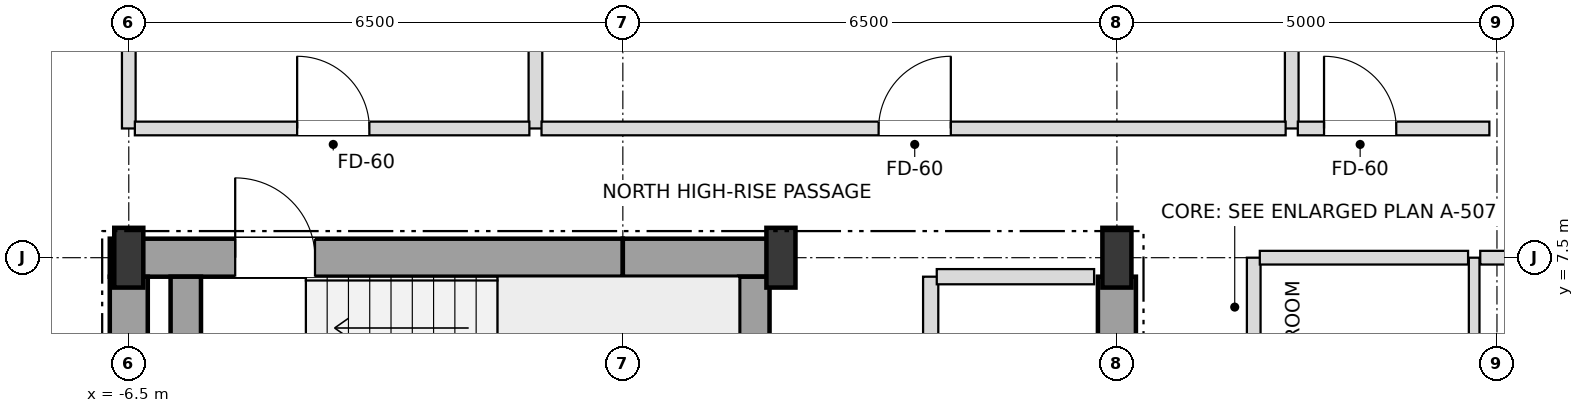
"""IFC4 building model, lengths in metres.
Left out: names, types, materials, properties, quantities, classifications, styles, units other than length and angle.
Written with IfcOpenShell. Run it as: python <this file> out.ifc"""

import sys

from ifc_helpers import new_model, si_unit, direction, frame, frame_2d, origin, origin_2d, place, context, subcontext, project, spatial, rectangle, i_section, extrude, element, fill, save


model = new_model("IFC4")
c1 = context("Model", 3, precision=1e-05, world=origin(), true_north=direction((0.0, 1.0)))
c2 = subcontext(c1, "Body", "Model", "MODEL_VIEW")
j1 = project(units=[si_unit("LENGTHUNIT", "METRE"), si_unit("PLANEANGLEUNIT", "RADIAN")], contexts=[c1])
p1 = place(None, origin())
s1 = spatial("IfcSite", under=j1, at=p1, CompositionType="ELEMENT")
p2 = place(p1, origin())
s2 = spatial("IfcBuilding", under=s1, at=p2, CompositionType="ELEMENT")
p3 = place(p2, frame((0.0, 0.0, 287.1)))
s3 = spatial("IfcBuildingStorey", under=s2, at=p3, CompositionType="ELEMENT", Elevation=287.1)
for number, where, z_axis, x_axis in (
    (1, (-6.5, 7.5, 0.0), (0.0, 0.0, 1.0), (1.0, 0.0, 0.0)),
    (2, (2.08, 7.5, 0.0), (0.0, 0.0, 1.0), (1.0, 0.0, 0.0)),
    (3, (6.5, 7.5, 0.0), (0.0, 0.0, 1.0), (1.0, 0.0, 0.0)),
):
    element("IfcColumn", number, at=place(p3, frame(where, z_axis=z_axis, x_axis=x_axis)), inside=s3, PredefinedType="COLUMN", context=c2, shape_type="SweptSolid", body=[
        extrude(i_section(OverallWidth=0.382, OverallDepth=0.786, WebThickness=0.02, FlangeThickness=0.033, at=origin_2d()), origin(), (0.0, 0.0, 1.0), 3.6),
    ])
p4 = place(p3, frame((-6.75, 7.5, 0.0), z_axis=(0.0, 0.0, 1.0), x_axis=(1.0, 0.0, 0.0)))
e4 = element("IfcWall", 4, at=p4, inside=s3, PredefinedType="SHEAR", context=c2, shape_type="SweptSolid", body=[
    extrude(rectangle(XDim=6.75, YDim=0.5, at=frame_2d((3.375, 0.0))), origin(), (0.0, 0.0, 1.0), 3.38),
])
p5 = place(p4, frame((1.65, 0.0, 0.0)))
e5 = element("IfcOpeningElement", 5, at=p5, cuts=e4, PredefinedType="OPENING", context=c2, shape_type="SweptSolid", body=[
    extrude(rectangle(XDim=1.05, YDim=2.15, at=frame_2d((0.525, 1.075))), frame((0.0, 0.26, 0.0), z_axis=(0.0, -1.0, 0.0), x_axis=(1.0, 0.0, 0.0)), (0.0, 0.0, 1.0), 0.52),
])
p6 = place(p3, frame((0.0, 7.5, 0.0), z_axis=(0.0, 0.0, 1.0), x_axis=(1.0, 0.0, 0.0)))
e6 = element("IfcWall", 6, at=p6, inside=s3, PredefinedType="SHEAR", context=c2, shape_type="SweptSolid", body=[
    extrude(rectangle(XDim=2.08, YDim=0.5, at=frame_2d((1.04, 0.0))), origin(), (0.0, 0.0, 1.0), 3.38),
])
for number, where, z_axis, x_axis in (
    (7, (-6.5, 3.95, 0.0), (0.0, 0.0, 1.0), (0.0, 1.0, 0.0)),
    (8, (6.5, 3.95, 0.0), (0.0, 0.0, 1.0), (0.0, 1.0, 0.0)),
):
    element("IfcWall", number, at=place(p3, frame(where, z_axis=z_axis, x_axis=x_axis)), inside=s3, PredefinedType="SHEAR", context=c2, shape_type="SweptSolid", body=[
        extrude(rectangle(XDim=3.3, YDim=0.5, at=frame_2d((1.65, 0.0))), origin(), (0.0, 0.0, 1.0), 3.38),
    ])
for number, where, z_axis, x_axis in (
    (9, (1.73, 3.95, 0.0), (0.0, 0.0, 1.0), (0.0, 1.0, 0.0)),
    (10, (-5.75, 3.95, 0.0), (0.0, 0.0, 1.0), (0.0, 1.0, 0.0)),
):
    element("IfcWall", number, at=place(p3, frame(where, z_axis=z_axis, x_axis=x_axis)), inside=s3, PredefinedType="SHEAR", context=c2, shape_type="SweptSolid", body=[
        extrude(rectangle(XDim=3.3, YDim=0.4, at=frame_2d((1.65, 0.0))), origin(), (0.0, 0.0, 1.0), 3.38),
    ])
p7 = place(p3, frame((-6.5, 9.2, 0.0), z_axis=(0.0, 0.0, 1.0), x_axis=(0.0, 1.0, 0.0)))
e11 = element("IfcWall", 11, at=p7, inside=s3, PredefinedType="PARTITIONING", context=c2, shape_type="SweptSolid", body=[
    extrude(rectangle(XDim=10.7, YDim=0.18, at=frame_2d((5.35, 0.0))), origin(), (0.0, 0.0, 1.0), 2.826),
])
p8 = place(p3, frame((-1.15, 9.2, 0.0), z_axis=(0.0, 0.0, 1.0), x_axis=(0.0, 1.0, 0.0)))
e12 = element("IfcWall", 12, at=p8, inside=s3, PredefinedType="PARTITIONING", context=c2, shape_type="SweptSolid", body=[
    extrude(rectangle(XDim=10.7, YDim=0.18, at=frame_2d((5.35, 0.0))), origin(), (0.0, 0.0, 1.0), 3.018),
])
p9 = place(p3, frame((4.05, 4.2, 0.0), z_axis=(0.0, 0.0, 1.0), x_axis=(0.0, 1.0, 0.0)))
e13 = element("IfcWall", 13, at=p9, inside=s3, PredefinedType="SOLIDWALL", context=c2, shape_type="SweptSolid", body=[
    extrude(rectangle(XDim=3.05, YDim=0.2, at=frame_2d((1.525, 0.0))), origin(), (0.0, 0.0, 1.0), 3.38),
])
p10 = place(p9, frame((0.975, 0.0, 0.0)))
e14 = element("IfcOpeningElement", 14, at=p10, cuts=e13, PredefinedType="OPENING", context=c2, shape_type="SweptSolid", body=[
    extrude(rectangle(XDim=0.95, YDim=2.15, at=frame_2d((0.475, 1.075))), frame((0.0, 0.11, 0.0), z_axis=(0.0, -1.0, 0.0), x_axis=(1.0, 0.0, 0.0)), (0.0, 0.0, 1.0), 0.22),
])
p11 = place(p3, frame((8.3, -7.5, 0.0), z_axis=(0.0, 0.0, 1.0), x_axis=(0.0, 1.0, 0.0)))
e15 = element("IfcWall", 15, at=p11, inside=s3, PredefinedType="PARTITIONING", context=c2, shape_type="SweptSolid", body=[
    extrude(rectangle(XDim=15.0, YDim=0.18, at=frame_2d((7.5, 0.0))), origin(), (0.0, 0.0, 1.0), 3.38),
])
p12 = place(p11, frame((2.355, 0.0, 0.0)))
e16 = element("IfcOpeningElement", 16, at=p12, cuts=e15, PredefinedType="OPENING", context=c2, shape_type="SweptSolid", body=[
    extrude(rectangle(XDim=0.95, YDim=2.15, at=frame_2d((0.475, 1.075))), frame((0.0, 0.1, 0.0), z_axis=(0.0, -1.0, 0.0), x_axis=(1.0, 0.0, 0.0)), (0.0, 0.0, 1.0), 0.2),
])
p13 = place(p3, frame((8.8, 9.2, 0.0), z_axis=(0.0, 0.0, 1.0), x_axis=(0.0, 1.0, 0.0)))
e17 = element("IfcWall", 17, at=p13, inside=s3, PredefinedType="PARTITIONING", context=c2, shape_type="SweptSolid", body=[
    extrude(rectangle(XDim=10.7, YDim=0.18, at=frame_2d((5.35, 0.0))), origin(), (0.0, 0.0, 1.0), 2.826),
])
p14 = place(p3, frame((11.2, -7.5, 0.0), z_axis=(0.0, 0.0, 1.0), x_axis=(0.0, 1.0, 0.0)))
e18 = element("IfcWall", 18, at=p14, inside=s3, PredefinedType="PARTITIONING", context=c2, shape_type="SweptSolid", body=[
    extrude(rectangle(XDim=15.0, YDim=0.14, at=frame_2d((7.5, 0.0))), origin(), (0.0, 0.0, 1.0), 3.38),
])
p15 = place(p14, frame((3.475, 0.0, 0.0)))
e19 = element("IfcOpeningElement", 19, at=p15, cuts=e18, PredefinedType="OPENING", context=c2, shape_type="SweptSolid", body=[
    extrude(rectangle(XDim=0.95, YDim=2.1, at=frame_2d((0.475, 1.05))), frame((0.0, 0.08, 0.0), z_axis=(0.0, -1.0, 0.0), x_axis=(1.0, 0.0, 0.0)), (0.0, 0.0, 1.0), 0.16),
])
p16 = place(p3, frame((4.13, 7.25, 0.0), z_axis=(0.0, 0.0, 1.0), x_axis=(1.0, 0.0, 0.0)))
e20 = element("IfcWall", 20, at=p16, inside=s3, PredefinedType="SOLIDWALL", context=c2, shape_type="SweptSolid", body=[
    extrude(rectangle(XDim=2.07, YDim=0.2, at=frame_2d((1.035, 0.0))), origin(), (0.0, 0.0, 1.0), 3.38),
])
p17 = place(p3, frame((8.38, 7.5, 0.0), z_axis=(0.0, 0.0, 1.0), x_axis=(1.0, 0.0, 0.0)))
e21 = element("IfcWall", 21, at=p17, inside=s3, PredefinedType="PARTITIONING", context=c2, shape_type="SweptSolid", body=[
    extrude(rectangle(XDim=2.74, YDim=0.18, at=frame_2d((1.37, 0.0))), origin(), (0.0, 0.0, 1.0), 2.826),
])
p18 = place(p3, frame((11.28, 7.5, 0.0), z_axis=(0.0, 0.0, 1.0), x_axis=(1.0, 0.0, 0.0)))
e22 = element("IfcWall", 22, at=p18, inside=s3, PredefinedType="PARTITIONING", context=c2, shape_type="SweptSolid", body=[
    extrude(rectangle(XDim=5.62, YDim=0.18, at=frame_2d((2.81, 0.0))), origin(), (0.0, 0.0, 1.0), 2.826),
])
p19 = place(p3, frame((-6.42, 9.2, 0.0), z_axis=(0.0, 0.0, 1.0), x_axis=(1.0, 0.0, 0.0)))
e23 = element("IfcWall", 23, at=p19, inside=s3, PredefinedType="PARTITIONING", context=c2, shape_type="SweptSolid", body=[
    extrude(rectangle(XDim=5.19, YDim=0.18, at=frame_2d((2.595, 0.0))), origin(), (0.0, 0.0, 1.0), 3.38),
])
p20 = place(p19, frame((2.135, 0.0, 0.0)))
e24 = element("IfcOpeningElement", 24, at=p20, cuts=e23, PredefinedType="OPENING", context=c2, shape_type="SweptSolid", body=[
    extrude(rectangle(XDim=0.95, YDim=2.15, at=frame_2d((0.475, 1.075))), frame((0.0, 0.1, 0.0), z_axis=(0.0, -1.0, 0.0), x_axis=(1.0, 0.0, 0.0)), (0.0, 0.0, 1.0), 0.2),
])
p21 = place(p3, frame((-1.07, 9.2, 0.0), z_axis=(0.0, 0.0, 1.0), x_axis=(1.0, 0.0, 0.0)))
e25 = element("IfcWall", 25, at=p21, inside=s3, PredefinedType="PARTITIONING", context=c2, shape_type="SweptSolid", body=[
    extrude(rectangle(XDim=9.79, YDim=0.18, at=frame_2d((4.895, 0.0))), origin(), (0.0, 0.0, 1.0), 2.826),
])
p22 = place(p21, frame((4.435, 0.0, 0.0)))
e26 = element("IfcOpeningElement", 26, at=p22, cuts=e25, PredefinedType="OPENING", context=c2, shape_type="SweptSolid", body=[
    extrude(rectangle(XDim=0.95, YDim=2.15, at=frame_2d((0.475, 1.075))), frame((0.0, 0.1, 0.0), z_axis=(0.0, -1.0, 0.0), x_axis=(1.0, 0.0, 0.0)), (0.0, 0.0, 1.0), 0.2),
])
p23 = place(p3, frame((8.88, 9.2, 0.0), z_axis=(0.0, 0.0, 1.0), x_axis=(1.0, 0.0, 0.0)))
e27 = element("IfcWall", 27, at=p23, inside=s3, PredefinedType="PARTITIONING", context=c2, shape_type="SweptSolid", body=[
    extrude(rectangle(XDim=2.52, YDim=0.18, at=frame_2d((1.26, 0.0))), origin(), (0.0, 0.0, 1.0), 3.38),
])
p24 = place(p23, frame((0.345, 0.0, 0.0)))
e28 = element("IfcOpeningElement", 28, at=p24, cuts=e27, PredefinedType="OPENING", context=c2, shape_type="SweptSolid", body=[
    extrude(rectangle(XDim=0.95, YDim=2.15, at=frame_2d((0.475, 1.075))), frame((0.0, 0.1, 0.0), z_axis=(0.0, -1.0, 0.0), x_axis=(1.0, 0.0, 0.0)), (0.0, 0.0, 1.0), 0.2),
])
p25 = place(p5, origin())
e29 = element("IfcDoor", 29, at=p25, inside=s3, OperationType="SINGLE_SWING_LEFT", PredefinedType="DOOR", context=c2, shape_type="SweptSolid", body=[
    extrude(rectangle(XDim=1.05, YDim=2.15, at=frame_2d((0.525, 1.075))), frame((0.0, 0.025, 0.0), z_axis=(0.0, -1.0, 0.0), x_axis=(1.0, 0.0, 0.0)), (0.0, 0.0, 1.0), 0.05),
])
fill(e5, e29)
p26 = place(p20, origin())
e30 = element("IfcDoor", 30, at=p26, inside=s3, OperationType="SINGLE_SWING_LEFT", PredefinedType="DOOR", context=c2, shape_type="SweptSolid", body=[
    extrude(rectangle(XDim=0.95, YDim=2.15, at=frame_2d((0.475, 1.075))), frame((0.0, 0.025, 0.0), z_axis=(0.0, -1.0, 0.0), x_axis=(1.0, 0.0, 0.0)), (0.0, 0.0, 1.0), 0.05),
])
fill(e24, e30)
p27 = place(p22, origin())
e31 = element("IfcDoor", 31, at=p27, inside=s3, OperationType="SINGLE_SWING_RIGHT", PredefinedType="DOOR", context=c2, shape_type="SweptSolid", body=[
    extrude(rectangle(XDim=0.95, YDim=2.15, at=frame_2d((0.475, 1.075))), frame((0.0, 0.025, 0.0), z_axis=(0.0, -1.0, 0.0), x_axis=(1.0, 0.0, 0.0)), (0.0, 0.0, 1.0), 0.05),
])
fill(e26, e31)
p28 = place(p24, origin())
e32 = element("IfcDoor", 32, at=p28, inside=s3, OperationType="SINGLE_SWING_LEFT", PredefinedType="DOOR", context=c2, shape_type="SweptSolid", body=[
    extrude(rectangle(XDim=0.95, YDim=2.15, at=frame_2d((0.475, 1.075))), frame((0.0, 0.025, 0.0), z_axis=(0.0, -1.0, 0.0), x_axis=(1.0, 0.0, 0.0)), (0.0, 0.0, 1.0), 0.05),
])
fill(e28, e32)
save(model, sys.argv[1])
